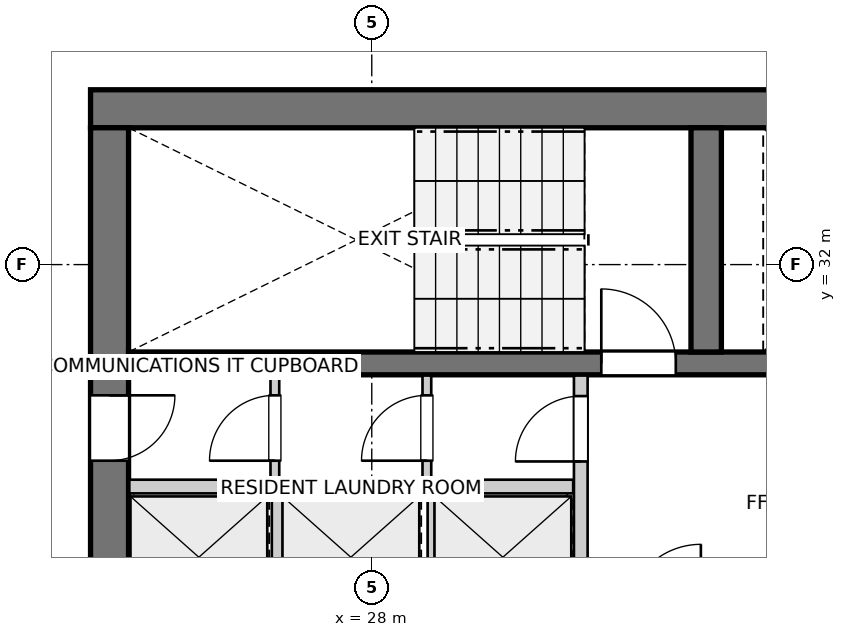
"""IFC4 building model, lengths in metres.
Left out: names, types, materials, properties, quantities, classifications, styles, units other than length and angle.
Written with IfcOpenShell. Run it as: python <this file> out.ifc"""

import sys

from ifc_helpers import new_model, si_unit, direction, frame, frame_2d, origin, place, context, subcontext, project, spatial, rectangle, extrude, source, transform, mapped, element, fill, save


model = new_model("IFC4")
c1 = context("Model", 3, precision=1e-05, world=origin(), true_north=direction((0.0, 1.0)))
c2 = subcontext(c1, "Body", "Model", "MODEL_VIEW")
j1 = project(units=[si_unit("LENGTHUNIT", "METRE"), si_unit("PLANEANGLEUNIT", "RADIAN")], contexts=[c1])
p1 = place(None, origin())
s1 = spatial("IfcSite", under=j1, at=p1, CompositionType="ELEMENT")
p2 = place(p1, origin())
s2 = spatial("IfcBuilding", under=s1, at=p2, CompositionType="ELEMENT")
p3 = place(p2, frame((0.0, 0.0, 218.0)))
s3 = spatial("IfcBuildingStorey", under=s2, at=p3, CompositionType="ELEMENT", Elevation=218.0)
p4 = place(p3, frame((36.4, 34.05, 0.0), z_axis=(0.0, 0.0, 1.0), x_axis=(-1.0, 0.0, 0.0)))
e1 = element("IfcWall", 1, at=p4, inside=s3, PredefinedType="SHEAR", context=c2, shape_type="SweptSolid", body=[
    extrude(rectangle(XDim=12.1, YDim=0.5, at=frame_2d((6.05, 0.0))), origin(), (0.0, 0.0, 1.0), 2.96),
])
p5 = place(p3, frame((24.55, 33.8, 0.0), z_axis=(0.0, 0.0, 1.0), x_axis=(0.0, -1.0, 0.0)))
e2 = element("IfcWall", 2, at=p5, inside=s3, PredefinedType="SHEAR", context=c2, shape_type="SweptSolid", body=[
    extrude(rectangle(XDim=15.6, YDim=0.5, at=frame_2d((7.8, 0.0))), origin(), (0.0, 0.0, 1.0), 2.96),
])
p6 = place(p5, frame((7.05, 0.0, 0.0)))
e3 = element("IfcOpeningElement", 3, at=p6, cuts=e2, PredefinedType="OPENING", context=c2, shape_type="SweptSolid", body=[
    extrude(rectangle(XDim=1.5, YDim=2.15, at=frame_2d((0.75, 1.075))), frame((0.0, 0.26, 0.0), z_axis=(0.0, -1.0, 0.0), x_axis=(1.0, 0.0, 0.0)), (0.0, 0.0, 1.0), 0.52),
])
p7 = place(p5, frame((3.52, 0.0, 0.0)))
e4 = element("IfcOpeningElement", 4, at=p7, cuts=e2, PredefinedType="OPENING", context=c2, shape_type="SweptSolid", body=[
    extrude(rectangle(XDim=0.86, YDim=2.05, at=frame_2d((0.43, 1.025))), frame((0.0, 0.26, 0.0), z_axis=(0.0, -1.0, 0.0), x_axis=(1.0, 0.0, 0.0)), (0.0, 0.0, 1.0), 0.52),
])
p8 = place(p5, frame((11.22, 0.0, 0.0)))
e5 = element("IfcOpeningElement", 5, at=p8, cuts=e2, PredefinedType="OPENING", context=c2, shape_type="SweptSolid", body=[
    extrude(rectangle(XDim=0.86, YDim=2.05, at=frame_2d((0.43, 1.025))), frame((0.0, 0.26, 0.0), z_axis=(0.0, -1.0, 0.0), x_axis=(1.0, 0.0, 0.0)), (0.0, 0.0, 1.0), 0.52),
])
p9 = place(p3, frame((24.8, 30.7, 0.0), z_axis=(0.0, 0.0, 1.0), x_axis=(1.0, 0.0, 0.0)))
e6 = element("IfcWall", 6, at=p9, inside=s3, PredefinedType="SHEAR", context=c2, shape_type="SweptSolid", body=[
    extrude(rectangle(XDim=11.1, YDim=0.3, at=frame_2d((5.55, 0.0))), origin(), (0.0, 0.0, 1.0), 2.96),
])
p10 = place(p9, frame((6.22, 0.0, 0.0)))
e7 = element("IfcOpeningElement", 7, at=p10, cuts=e6, PredefinedType="OPENING", context=c2, shape_type="SweptSolid", body=[
    extrude(rectangle(XDim=0.98, YDim=2.15, at=frame_2d((0.49, 1.075))), frame((0.0, 0.16, 0.0), z_axis=(0.0, -1.0, 0.0), x_axis=(1.0, 0.0, 0.0)), (0.0, 0.0, 1.0), 0.32),
])
p11 = place(p9, frame((9.15, 0.0, 0.0)))
e8 = element("IfcOpeningElement", 8, at=p11, cuts=e6, PredefinedType="OPENING", context=c2, shape_type="SweptSolid", body=[
    extrude(rectangle(XDim=1.15, YDim=2.15, at=frame_2d((0.575, 1.075))), frame((0.0, 0.16, 0.0), z_axis=(0.0, -1.0, 0.0), x_axis=(1.0, 0.0, 0.0)), (0.0, 0.0, 1.0), 0.32),
])
p12 = place(p3, frame((32.4, 30.85, 0.0), z_axis=(0.0, 0.0, 1.0), x_axis=(0.0, 1.0, 0.0)))
e9 = element("IfcWall", 9, at=p12, inside=s3, PredefinedType="SHEAR", context=c2, shape_type="SweptSolid", body=[
    extrude(rectangle(XDim=2.95, YDim=0.4, at=frame_2d((1.475, 0.0))), origin(), (0.0, 0.0, 1.0), 2.96),
])
p13 = place(p3, frame((30.75, 27.43, 0.0), z_axis=(0.0, 0.0, 1.0), x_axis=(0.0, 1.0, 0.0)))
e10 = element("IfcWall", 10, at=p13, inside=s3, PredefinedType="PARTITIONING", context=c2, shape_type="SweptSolid", body=[
    extrude(rectangle(XDim=3.11, YDim=0.18, at=frame_2d((1.555, 0.0))), origin(), (0.0, 0.0, 1.0), 2.96),
])
p14 = place(p13, frame((1.98, 0.0, 0.0)))
e11 = element("IfcOpeningElement", 11, at=p14, cuts=e10, PredefinedType="OPENING", context=c2, shape_type="SweptSolid", body=[
    extrude(rectangle(XDim=0.86, YDim=2.05, at=frame_2d((0.43, 1.025))), frame((0.0, 0.1, 0.0), z_axis=(0.0, -1.0, 0.0), x_axis=(1.0, 0.0, 0.0)), (0.0, 0.0, 1.0), 0.2),
])
p15 = place(p3, frame((24.81, 29.08, 0.0), z_axis=(0.0, 0.0, 1.0), x_axis=(1.0, 0.0, 0.0)))
e12 = element("IfcWall", 12, at=p15, inside=s3, PredefinedType="PARTITIONING", context=c2, shape_type="SweptSolid", body=[
    extrude(rectangle(XDim=5.84, YDim=0.18, at=frame_2d((2.92, 0.0))), origin(), (0.0, 0.0, 1.0), 2.96),
])
for number, where, z_axis, x_axis in (
    (13, (26.775, 27.2, 0.0), (0.0, 0.0, 1.0), (0.0, 1.0, 0.0)),
    (14, (28.825, 27.2, 0.0), (0.0, 0.0, 1.0), (0.0, 1.0, 0.0)),
):
    element("IfcWall", number, at=place(p3, frame(where, z_axis=z_axis, x_axis=x_axis)), inside=s3, PredefinedType="PARTITIONING", context=c2, shape_type="SweptSolid", body=[
        extrude(rectangle(XDim=1.78, YDim=0.18, at=frame_2d((0.89, 0.0))), origin(), (0.0, 0.0, 1.0), 2.96),
    ])
p16 = place(p3, frame((26.725, 29.16, 0.0), z_axis=(0.0, 0.0, 1.0), x_axis=(0.0, 1.0, 0.0)))
e15 = element("IfcWall", 15, at=p16, inside=s3, PredefinedType="PARTITIONING", context=c2, shape_type="SweptSolid", body=[
    extrude(rectangle(XDim=1.38, YDim=0.115, at=frame_2d((0.69, 0.0))), origin(), (0.0, 0.0, 1.0), 2.96),
])
p17 = place(p16, frame((0.26, 0.0, 0.0)))
e16 = element("IfcOpeningElement", 16, at=p17, cuts=e15, PredefinedType="OPENING", context=c2, shape_type="SweptSolid", body=[
    extrude(rectangle(XDim=0.86, YDim=2.05, at=frame_2d((0.43, 1.025))), frame((0.0, 0.067, 0.0), z_axis=(0.0, -1.0, 0.0), x_axis=(1.0, 0.0, 0.0)), (0.0, 0.0, 1.0), 0.135),
])
p18 = place(p3, frame((28.725, 29.16, 0.0), z_axis=(0.0, 0.0, 1.0), x_axis=(0.0, 1.0, 0.0)))
e17 = element("IfcWall", 17, at=p18, inside=s3, PredefinedType="PARTITIONING", context=c2, shape_type="SweptSolid", body=[
    extrude(rectangle(XDim=1.38, YDim=0.115, at=frame_2d((0.69, 0.0))), origin(), (0.0, 0.0, 1.0), 2.96),
])
p19 = place(p18, frame((0.26, 0.0, 0.0)))
e18 = element("IfcOpeningElement", 18, at=p19, cuts=e17, PredefinedType="OPENING", context=c2, shape_type="SweptSolid", body=[
    extrude(rectangle(XDim=0.86, YDim=2.05, at=frame_2d((0.43, 1.025))), frame((0.0, 0.067, 0.0), z_axis=(0.0, -1.0, 0.0), x_axis=(1.0, 0.0, 0.0)), (0.0, 0.0, 1.0), 0.135),
])
m1 = source(origin(), c2, "Body", "SweptSolid", [
    extrude(rectangle(XDim=0.98, YDim=2.15, at=frame_2d((0.49, 1.075))), frame((0.0, 0.025, 0.0), z_axis=(0.0, -1.0, 0.0), x_axis=(1.0, 0.0, 0.0)), (0.0, 0.0, 1.0), 0.05),
])
p20 = place(p10, origin())
e19 = element("IfcDoor", 19, at=p20, inside=s3, OperationType="SINGLE_SWING_LEFT", PredefinedType="DOOR", context=c2, shape_type="MappedRepresentation", body=[
    mapped(m1, transform((0.0, 0.0, 0.0), x_axis=(1.0, 0.0, 0.0), y_axis=(0.0, 1.0, 0.0), z_axis=(0.0, 0.0, 1.0), scale=1.0)),
])
fill(e7, e19)
m2 = source(origin(), c2, "Body", "SweptSolid", [
    extrude(rectangle(XDim=0.86, YDim=2.05, at=frame_2d((0.43, 1.025))), frame((0.0, 0.025, 0.0), z_axis=(0.0, -1.0, 0.0), x_axis=(1.0, 0.0, 0.0)), (0.0, 0.0, 1.0), 0.05),
])
p21 = place(p7, origin())
e20 = element("IfcDoor", 20, at=p21, inside=s3, OperationType="SINGLE_SWING_LEFT", PredefinedType="DOOR", context=c2, shape_type="MappedRepresentation", body=[
    mapped(m2, transform((0.0, 0.0, 0.0), x_axis=(1.0, 0.0, 0.0), y_axis=(0.0, 1.0, 0.0), z_axis=(0.0, 0.0, 1.0), scale=1.0)),
])
fill(e4, e20)
p22 = place(p14, origin())
e21 = element("IfcDoor", 21, at=p22, inside=s3, OperationType="SINGLE_SWING_LEFT", PredefinedType="DOOR", context=c2, shape_type="MappedRepresentation", body=[
    mapped(m2, transform((0.0, 0.0, 0.0), x_axis=(1.0, 0.0, 0.0), y_axis=(0.0, 1.0, 0.0), z_axis=(0.0, 0.0, 1.0), scale=1.0)),
])
fill(e11, e21)
p23 = place(p17, origin())
e22 = element("IfcDoor", 22, at=p23, inside=s3, OperationType="SINGLE_SWING_LEFT", PredefinedType="DOOR", context=c2, shape_type="MappedRepresentation", body=[
    mapped(m2, transform((0.0, 0.0, 0.0), x_axis=(1.0, 0.0, 0.0), y_axis=(0.0, 1.0, 0.0), z_axis=(0.0, 0.0, 1.0), scale=1.0)),
])
fill(e16, e22)
p24 = place(p19, origin())
e23 = element("IfcDoor", 23, at=p24, inside=s3, OperationType="SINGLE_SWING_LEFT", PredefinedType="DOOR", context=c2, shape_type="MappedRepresentation", body=[
    mapped(m2, transform((0.0, 0.0, 0.0), x_axis=(1.0, 0.0, 0.0), y_axis=(0.0, 1.0, 0.0), z_axis=(0.0, 0.0, 1.0), scale=1.0)),
])
fill(e18, e23)
save(model, sys.argv[1])
